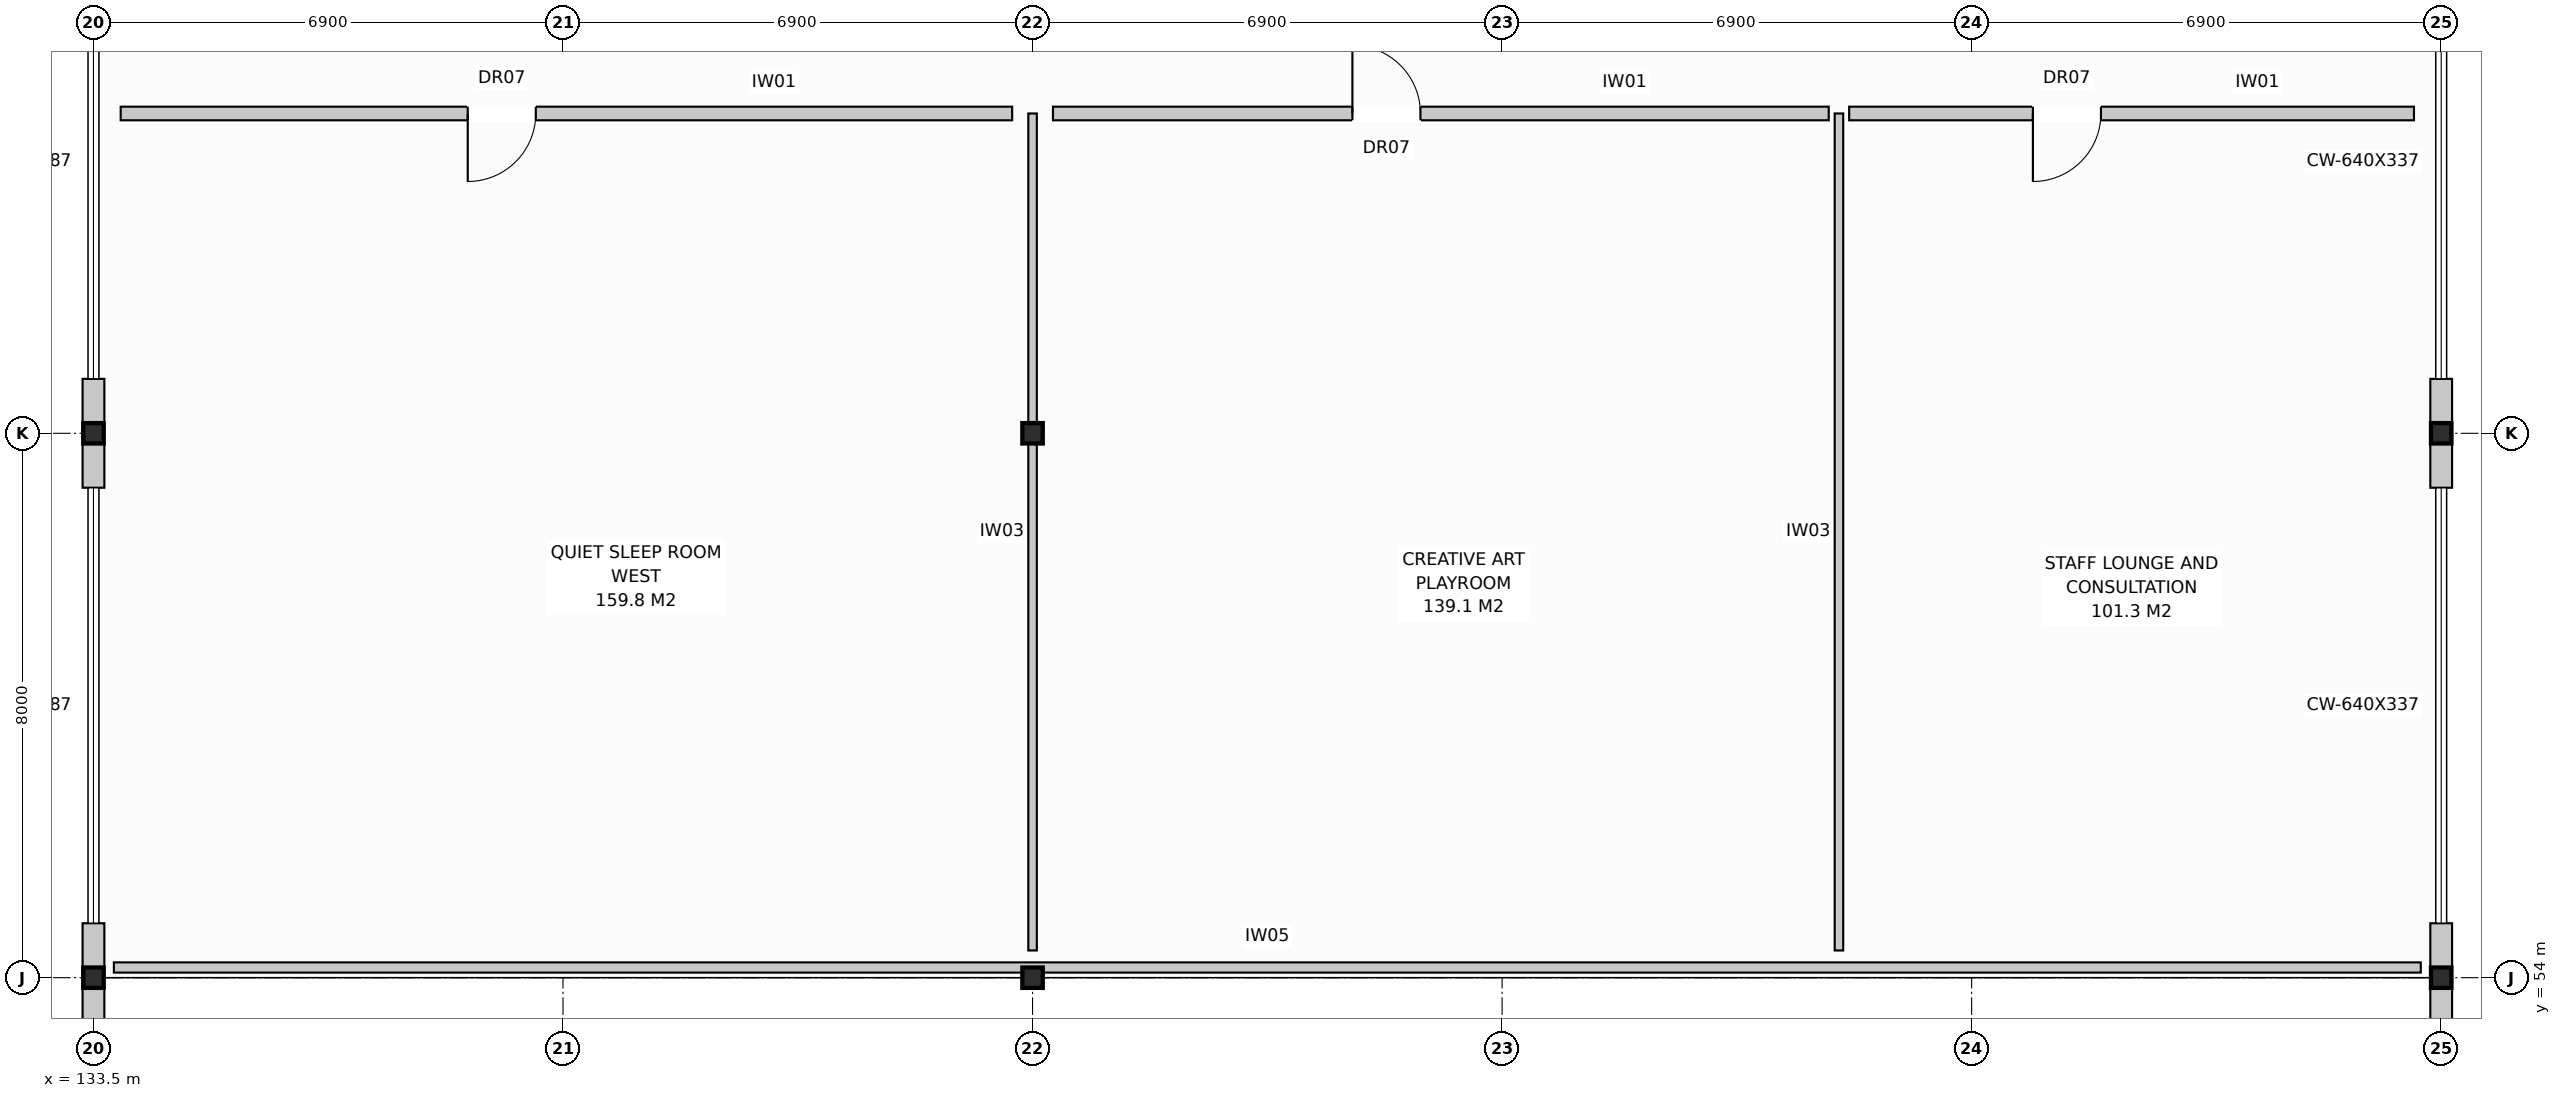
"""IFC4 building model, lengths in metres.
Left out: names, types, materials, properties, quantities, classifications, styles, units other than length and angle.
Written with IfcOpenShell. Run it as: python <this file> out.ifc"""

import sys

from ifc_helpers import new_model, si_unit, direction, frame, frame_2d, origin, origin_with_axes, origin_2d, place, context, subcontext, project, spatial, rectangle, i_section, extrude, element, fill, save


model = new_model("IFC4")
c1 = context("Model", 3, precision=1e-05, world=origin(), true_north=direction((0.0, 1.0)))
c2 = subcontext(c1, "Body", "Model", "MODEL_VIEW")
j1 = project(units=[si_unit("LENGTHUNIT", "METRE"), si_unit("PLANEANGLEUNIT", "RADIAN")], contexts=[c1])
p1 = place(None, origin())
s1 = spatial("IfcSite", under=j1, at=p1, CompositionType="ELEMENT")
p2 = place(p1, origin())
s2 = spatial("IfcBuilding", under=s1, at=p2, CompositionType="ELEMENT")
p3 = place(p2, frame((0.0, 0.0, 4.4)))
s3 = spatial("IfcBuildingStorey", under=s2, at=p3, CompositionType="ELEMENT", Elevation=4.4)
for number, where, z_axis, x_axis in (
    (1, (133.5, 54.0, 0.0), (0.0, 0.0, 1.0), (1.0, 0.0, 0.0)),
    (2, (133.5, 62.0, 0.0), (0.0, 0.0, 1.0), (1.0, 0.0, 0.0)),
    (3, (147.3, 54.0, 0.0), (0.0, 0.0, 1.0), (1.0, 0.0, 0.0)),
    (4, (147.3, 62.0, 0.0), (0.0, 0.0, 1.0), (1.0, 0.0, 0.0)),
    (5, (168.0, 54.0, 0.0), (0.0, 0.0, 1.0), (1.0, 0.0, 0.0)),
    (6, (168.0, 62.0, 0.0), (0.0, 0.0, 1.0), (1.0, 0.0, 0.0)),
):
    element("IfcColumn", number, at=place(p3, frame(where, z_axis=z_axis, x_axis=x_axis)), inside=s3, PredefinedType="COLUMN", context=c2, shape_type="SweptSolid", body=[
        extrude(i_section(OverallWidth=0.3, OverallDepth=0.3, WebThickness=0.011, FlangeThickness=0.019, at=origin_2d()), origin(), (0.0, 0.0, 1.0), 3.6),
    ])
p4 = place(p3, frame((133.5, 53.2, -0.28), z_axis=(0.0, 0.0, 1.0), x_axis=(0.0, 1.0, 0.0)))
e7 = element("IfcWall", 7, at=p4, inside=s3, PredefinedType="STANDARD", context=c2, shape_type="SweptSolid", body=[
    extrude(rectangle(XDim=0.8, YDim=0.32, at=frame_2d((0.4, 0.0))), origin(), (0.0, 0.0, 1.0), 3.15),
])
p5 = place(p3, frame((133.5, 54.0, 0.0), z_axis=(0.0, 0.0, 1.0), x_axis=(0.0, 1.0, 0.0)))
e8 = element("IfcWall", 8, at=p5, inside=s3, PredefinedType="STANDARD", context=c2, shape_type="SweptSolid", body=[
    extrude(rectangle(XDim=0.8, YDim=0.32, at=frame_2d((0.4, 0.0))), origin(), (0.0, 0.0, 1.0), 2.87),
])
p6 = place(p3, frame((133.5, 61.2, 0.0), z_axis=(0.0, 0.0, 1.0), x_axis=(0.0, 1.0, 0.0)))
e9 = element("IfcWall", 9, at=p6, inside=s3, PredefinedType="STANDARD", context=c2, shape_type="SweptSolid", body=[
    extrude(rectangle(XDim=1.6, YDim=0.32, at=frame_2d((0.8, 0.0))), origin(), (0.0, 0.0, 1.0), 2.87),
])
p7 = place(p3, frame((168.0, 53.2, -0.28), z_axis=(0.0, 0.0, 1.0), x_axis=(0.0, 1.0, 0.0)))
e10 = element("IfcWall", 10, at=p7, inside=s3, PredefinedType="STANDARD", context=c2, shape_type="SweptSolid", body=[
    extrude(rectangle(XDim=0.8, YDim=0.32, at=frame_2d((0.4, 0.0))), origin(), (0.0, 0.0, 1.0), 3.65),
])
p8 = place(p3, frame((168.0, 54.0, 0.0), z_axis=(0.0, 0.0, 1.0), x_axis=(0.0, 1.0, 0.0)))
e11 = element("IfcWall", 11, at=p8, inside=s3, PredefinedType="STANDARD", context=c2, shape_type="SweptSolid", body=[
    extrude(rectangle(XDim=0.8, YDim=0.32, at=frame_2d((0.4, 0.0))), origin(), (0.0, 0.0, 1.0), 3.37),
])
p9 = place(p3, frame((168.0, 61.2, 0.0), z_axis=(0.0, 0.0, 1.0), x_axis=(0.0, 1.0, 0.0)))
e12 = element("IfcWall", 12, at=p9, inside=s3, PredefinedType="STANDARD", context=c2, shape_type="SweptSolid", body=[
    extrude(rectangle(XDim=1.6, YDim=0.32, at=frame_2d((0.8, 0.0))), origin(), (0.0, 0.0, 1.0), 3.37),
])
p10 = place(p3, frame((133.9, 66.7, 0.0), z_axis=(0.0, 0.0, 1.0), x_axis=(1.0, 0.0, 0.0)))
e13 = element("IfcWall", 13, at=p10, inside=s3, PredefinedType="PARTITIONING", context=c2, shape_type="SweptSolid", body=[
    extrude(rectangle(XDim=13.1, YDim=0.2, at=frame_2d((6.55, 0.0))), origin(), (0.0, 0.0, 1.0), 3.33),
])
p11 = place(p10, frame((5.1, 0.0, 0.0)))
e14 = element("IfcOpeningElement", 14, at=p11, cuts=e13, PredefinedType="OPENING", context=c2, shape_type="SweptSolid", body=[
    extrude(rectangle(XDim=1.0, YDim=2.15, at=frame_2d((0.5, 1.075))), frame((0.0, 0.112, 0.0), z_axis=(0.0, -1.0, 0.0), x_axis=(1.0, 0.0, 0.0)), (0.0, 0.0, 1.0), 0.224),
])
p12 = place(p3, frame((147.6, 66.7, 0.0), z_axis=(0.0, 0.0, 1.0), x_axis=(1.0, 0.0, 0.0)))
e15 = element("IfcWall", 15, at=p12, inside=s3, PredefinedType="PARTITIONING", context=c2, shape_type="SweptSolid", body=[
    extrude(rectangle(XDim=11.4, YDim=0.2, at=frame_2d((5.7, 0.0))), origin(), (0.0, 0.0, 1.0), 3.33),
])
p13 = place(p12, frame((4.4, 0.0, 0.0)))
e16 = element("IfcOpeningElement", 16, at=p13, cuts=e15, PredefinedType="OPENING", context=c2, shape_type="SweptSolid", body=[
    extrude(rectangle(XDim=1.0, YDim=2.15, at=frame_2d((0.5, 1.075))), frame((0.0, 0.112, 0.0), z_axis=(0.0, -1.0, 0.0), x_axis=(1.0, 0.0, 0.0)), (0.0, 0.0, 1.0), 0.224),
])
p14 = place(p3, frame((159.3, 66.7, 0.0), z_axis=(0.0, 0.0, 1.0), x_axis=(1.0, 0.0, 0.0)))
e17 = element("IfcWall", 17, at=p14, inside=s3, PredefinedType="PARTITIONING", context=c2, shape_type="SweptSolid", body=[
    extrude(rectangle(XDim=8.3, YDim=0.2, at=frame_2d((4.15, 0.0))), origin(), (0.0, 0.0, 1.0), 3.33),
])
p15 = place(p14, frame((2.7, 0.0, 0.0)))
e18 = element("IfcOpeningElement", 18, at=p15, cuts=e17, PredefinedType="OPENING", context=c2, shape_type="SweptSolid", body=[
    extrude(rectangle(XDim=1.0, YDim=2.15, at=frame_2d((0.5, 1.075))), frame((0.0, 0.112, 0.0), z_axis=(0.0, -1.0, 0.0), x_axis=(1.0, 0.0, 0.0)), (0.0, 0.0, 1.0), 0.224),
])
p16 = place(p3, frame((147.3, 54.4, 0.0), z_axis=(0.0, 0.0, 1.0), x_axis=(0.0, 1.0, 0.0)))
e19 = element("IfcWall", 19, at=p16, inside=s3, PredefinedType="PARTITIONING", context=c2, shape_type="SweptSolid", body=[
    extrude(rectangle(XDim=12.3, YDim=0.125, at=frame_2d((6.15, 0.0))), origin(), (0.0, 0.0, 1.0), 2.78),
])
p17 = place(p3, frame((159.15, 54.4, 0.0), z_axis=(0.0, 0.0, 1.0), x_axis=(0.0, 1.0, 0.0)))
e20 = element("IfcWall", 20, at=p17, inside=s3, PredefinedType="PARTITIONING", context=c2, shape_type="SweptSolid", body=[
    extrude(rectangle(XDim=12.3, YDim=0.125, at=frame_2d((6.15, 0.0))), origin(), (0.0, 0.0, 1.0), 3.33),
])
p18 = place(p3, frame((133.8, 54.15, 0.0), z_axis=(0.0, 0.0, 1.0), x_axis=(1.0, 0.0, 0.0)))
e21 = element("IfcWall", 21, at=p18, inside=s3, PredefinedType="PARTITIONING", context=c2, shape_type="SweptSolid", body=[
    extrude(rectangle(XDim=33.9, YDim=0.15, at=frame_2d((16.95, 0.0))), origin(), (0.0, 0.0, 1.0), 2.69),
])
p19 = place(p11, frame((1.0, 0.0, 0.0), z_axis=(0.0, 0.0, 1.0), x_axis=(-1.0, 0.0, 0.0)))
e22 = element("IfcDoor", 22, at=p19, inside=s3, OperationType="SINGLE_SWING_LEFT", PredefinedType="DOOR", context=c2, shape_type="SweptSolid", body=[
    extrude(rectangle(XDim=1.0, YDim=2.15, at=frame_2d((0.5, 1.075))), frame((0.0, 0.025, 0.0), z_axis=(0.0, -1.0, 0.0), x_axis=(1.0, 0.0, 0.0)), (0.0, 0.0, 1.0), 0.05),
])
fill(e14, e22)
p20 = place(p13, origin_with_axes())
e23 = element("IfcDoor", 23, at=p20, inside=s3, OperationType="SINGLE_SWING_LEFT", PredefinedType="DOOR", context=c2, shape_type="SweptSolid", body=[
    extrude(rectangle(XDim=1.0, YDim=2.15, at=frame_2d((0.5, 1.075))), frame((0.0, 0.025, 0.0), z_axis=(0.0, -1.0, 0.0), x_axis=(1.0, 0.0, 0.0)), (0.0, 0.0, 1.0), 0.05),
])
fill(e16, e23)
p21 = place(p15, frame((1.0, 0.0, 0.0), z_axis=(0.0, 0.0, 1.0), x_axis=(-1.0, 0.0, 0.0)))
e24 = element("IfcDoor", 24, at=p21, inside=s3, OperationType="SINGLE_SWING_LEFT", PredefinedType="DOOR", context=c2, shape_type="SweptSolid", body=[
    extrude(rectangle(XDim=1.0, YDim=2.15, at=frame_2d((0.5, 1.075))), frame((0.0, 0.025, 0.0), z_axis=(0.0, -1.0, 0.0), x_axis=(1.0, 0.0, 0.0)), (0.0, 0.0, 1.0), 0.05),
])
fill(e18, e24)
save(model, sys.argv[1])
